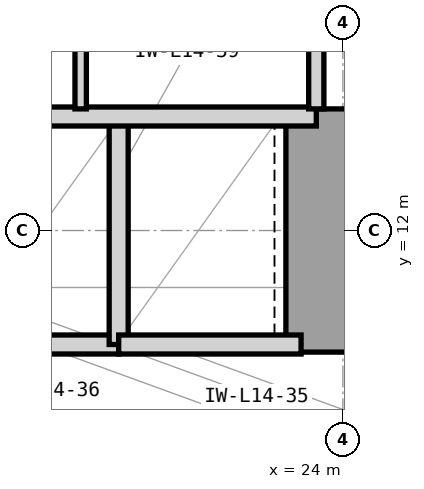
"""IFC4 building model, lengths in metres.
Left out: names, types, materials, properties, quantities, classifications, styles, units other than length and angle.
Written with IfcOpenShell. Run it as: python <this file> out.ifc"""

import sys

from ifc_helpers import new_model, si_unit, direction, frame, frame_2d, origin, place, context, subcontext, project, spatial, rectangle, extrude, element, save


model = new_model("IFC4")
c1 = context("Model", 3, precision=1e-05, world=origin(), true_north=direction((0.0, 1.0)))
c2 = subcontext(c1, "Body", "Model", "MODEL_VIEW")
j1 = project(units=[si_unit("LENGTHUNIT", "METRE"), si_unit("PLANEANGLEUNIT", "RADIAN")], contexts=[c1])
p1 = place(None, origin())
s1 = spatial("IfcSite", under=j1, at=p1, CompositionType="ELEMENT")
p2 = place(p1, origin())
s2 = spatial("IfcBuilding", under=s1, at=p2, CompositionType="ELEMENT")
p3 = place(p2, frame((0.0, 0.0, 63.6)))
s3 = spatial("IfcBuildingStorey", under=s2, at=p3, CompositionType="ELEMENT", Elevation=63.6)
p4 = place(p3, frame((23.65, 10.4, 0.0), z_axis=(0.0, 0.0, 1.0), x_axis=(0.0, 1.0, 0.0)))
e1 = element("IfcWall", 1, at=p4, inside=s3, PredefinedType="SHEAR", context=c2, shape_type="SweptSolid", body=[
    extrude(rectangle(XDim=3.2, YDim=0.8, at=frame_2d((1.6, 0.0))), origin(), (0.0, 0.0, 1.0), 4.2),
])
p5 = place(p3, frame((18.95, 10.5, 0.0), z_axis=(0.0, 0.0, 1.0), x_axis=(1.0, 0.0, 0.0)))
e2 = element("IfcWall", 2, at=p5, inside=s3, PredefinedType="PARTITIONING", context=c2, shape_type="SweptSolid", body=[
    extrude(rectangle(XDim=2.1, YDim=0.25, at=frame_2d((1.05, 0.0))), origin(), (0.0, 0.0, 1.0), 3.426),
])
p6 = place(p3, frame((21.05, 10.5, 0.0), z_axis=(0.0, 0.0, 1.0), x_axis=(0.0, 1.0, 0.0)))
e3 = element("IfcWall", 3, at=p6, inside=s3, PredefinedType="PARTITIONING", context=c2, shape_type="SweptSolid", body=[
    extrude(rectangle(XDim=3.0, YDim=0.25, at=frame_2d((1.5, 0.0))), origin(), (0.0, 0.0, 1.0), 3.97),
])
p7 = place(p3, frame((21.05, 10.5, 0.0), z_axis=(0.0, 0.0, 1.0), x_axis=(1.0, 0.0, 0.0)))
e4 = element("IfcWall", 4, at=p7, inside=s3, PredefinedType="PARTITIONING", context=c2, shape_type="SweptSolid", body=[
    extrude(rectangle(XDim=2.4, YDim=0.25, at=frame_2d((1.2, 0.0))), origin(), (0.0, 0.0, 1.0), 3.426),
])
p8 = place(p3, frame((14.7, 13.5, 0.0), z_axis=(0.0, 0.0, 1.0), x_axis=(1.0, 0.0, 0.0)))
e5 = element("IfcWall", 5, at=p8, inside=s3, PredefinedType="PARTITIONING", context=c2, shape_type="SweptSolid", body=[
    extrude(rectangle(XDim=8.95, YDim=0.25, at=frame_2d((4.475, 0.0))), origin(), (0.0, 0.0, 1.0), 3.426),
])
p9 = place(p3, frame((20.55, 13.6, 0.0), z_axis=(0.0, 0.0, 1.0), x_axis=(0.0, 1.0, 0.0)))
e6 = element("IfcWall", 6, at=p9, inside=s3, PredefinedType="PARTITIONING", context=c2, shape_type="SweptSolid", body=[
    extrude(rectangle(XDim=3.0, YDim=0.15, at=frame_2d((1.5, 0.0))), origin(), (0.0, 0.0, 1.0), 3.97),
])
p10 = place(p3, frame((23.65, 13.6, 0.0), z_axis=(0.0, 0.0, 1.0), x_axis=(0.0, 1.0, 0.0)))
e7 = element("IfcWall", 7, at=p10, inside=s3, PredefinedType="PARTITIONING", context=c2, shape_type="SweptSolid", body=[
    extrude(rectangle(XDim=3.0, YDim=0.2, at=frame_2d((1.5, 0.0))), origin(), (0.0, 0.0, 1.0), 3.97),
])
p11 = place(p10, frame((1.02, 0.0, 0.0)))
e8 = element("IfcOpeningElement", 8, at=p11, cuts=e7, PredefinedType="OPENING", context=c2, shape_type="SweptSolid", body=[
    extrude(rectangle(XDim=0.95, YDim=2.1, at=frame_2d((0.475, 1.05))), frame((0.0, 0.11, 0.0), z_axis=(0.0, -1.0, 0.0), x_axis=(1.0, 0.0, 0.0)), (0.0, 0.0, 1.0), 0.22),
])
save(model, sys.argv[1])
